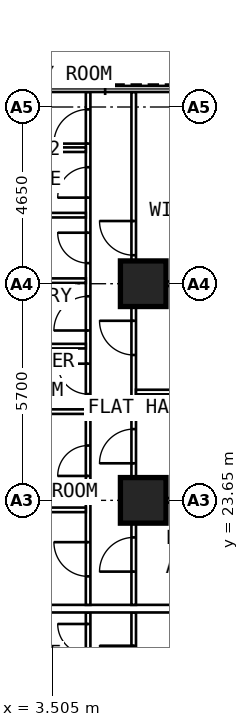
"""IFC4 building model, lengths in metres.
Left out: names, types, materials, properties, quantities, classifications, styles, units other than length and angle.
Written with IfcOpenShell. Run it as: python <this file> out.ifc"""

import sys

from ifc_helpers import new_model, si_unit, direction, frame, frame_2d, origin, origin_2d, place, context, subcontext, project, spatial, rectangle, extrude, element, fill, save


model = new_model("IFC4")
c1 = context("Model", 3, precision=1e-05, world=origin(), true_north=direction((0.0, 1.0)))
c2 = subcontext(c1, "Body", "Model", "MODEL_VIEW")
j1 = project(units=[si_unit("LENGTHUNIT", "METRE"), si_unit("PLANEANGLEUNIT", "RADIAN")], contexts=[c1])
p1 = place(None, origin())
s1 = spatial("IfcSite", under=j1, at=p1, CompositionType="ELEMENT")
p2 = place(p1, origin())
s2 = spatial("IfcBuilding", under=s1, at=p2, CompositionType="ELEMENT")
p3 = place(p2, frame((0.0, 0.0, 88.0)))
s3 = spatial("IfcBuildingStorey", under=s2, at=p3, CompositionType="ELEMENT", Elevation=88.0)
for number, where, z_axis, x_axis in (
    (1, (5.9, 23.65, 0.0), (0.0, 0.0, 1.0), (0.0, 1.0, 0.0)),
    (2, (5.9, 29.35, 0.0), (0.0, 0.0, 1.0), (0.0, 1.0, 0.0)),
):
    element("IfcColumn", number, at=place(p3, frame(where, z_axis=z_axis, x_axis=x_axis)), inside=s3, PredefinedType="COLUMN", context=c2, shape_type="SweptSolid", body=[
        extrude(rectangle(XDim=1.2, YDim=1.2, at=origin_2d()), origin(), (0.0, 0.0, 1.0), 3.6),
    ])
p4 = place(p3, frame((4.45, 10.1, 0.0), z_axis=(0.0, 0.0, 1.0), x_axis=(0.0, 1.0, 0.0)))
e3 = element("IfcWall", 3, at=p4, inside=s3, PredefinedType="PARTITIONING", context=c2, shape_type="SweptSolid", body=[
    extrude(rectangle(XDim=10.6, YDim=0.12, at=frame_2d((5.3, 0.0))), origin(), (0.0, 0.0, 1.0), 3.35),
])
p5 = place(p4, frame((1.59, 0.0, 0.0)))
e4 = element("IfcOpeningElement", 4, at=p5, cuts=e3, PredefinedType="OPENING", context=c2, shape_type="SweptSolid", body=[
    extrude(rectangle(XDim=0.8, YDim=2.1, at=frame_2d((0.4, 1.05))), frame((0.0, 0.072, 0.0), z_axis=(0.0, -1.0, 0.0), x_axis=(1.0, 0.0, 0.0)), (0.0, 0.0, 1.0), 0.144),
])
p6 = place(p4, frame((3.53, 0.0, 0.0)))
e5 = element("IfcOpeningElement", 5, at=p6, cuts=e3, PredefinedType="OPENING", context=c2, shape_type="SweptSolid", body=[
    extrude(rectangle(XDim=0.9, YDim=2.1, at=frame_2d((0.45, 1.05))), frame((0.0, 0.072, 0.0), z_axis=(0.0, -1.0, 0.0), x_axis=(1.0, 0.0, 0.0)), (0.0, 0.0, 1.0), 0.144),
])
p7 = place(p4, frame((5.884, 0.0, 0.0)))
e6 = element("IfcOpeningElement", 6, at=p7, cuts=e3, PredefinedType="OPENING", context=c2, shape_type="SweptSolid", body=[
    extrude(rectangle(XDim=0.8, YDim=2.1, at=frame_2d((0.4, 1.05))), frame((0.0, 0.072, 0.0), z_axis=(0.0, -1.0, 0.0), x_axis=(1.0, 0.0, 0.0)), (0.0, 0.0, 1.0), 0.144),
])
p8 = place(p4, frame((7.842, 0.0, 0.0)))
e7 = element("IfcOpeningElement", 7, at=p8, cuts=e3, PredefinedType="OPENING", context=c2, shape_type="SweptSolid", body=[
    extrude(rectangle(XDim=0.9, YDim=2.1, at=frame_2d((0.45, 1.05))), frame((0.0, 0.072, 0.0), z_axis=(0.0, -1.0, 0.0), x_axis=(1.0, 0.0, 0.0)), (0.0, 0.0, 1.0), 0.144),
])
p9 = place(p4, frame((9.497, 0.0, 0.0)))
e8 = element("IfcOpeningElement", 8, at=p9, cuts=e3, PredefinedType="OPENING", context=c2, shape_type="SweptSolid", body=[
    extrude(rectangle(XDim=0.8, YDim=2.1, at=frame_2d((0.4, 1.05))), frame((0.0, 0.072, 0.0), z_axis=(0.0, -1.0, 0.0), x_axis=(1.0, 0.0, 0.0)), (0.0, 0.0, 1.0), 0.144),
])
p10 = place(p3, frame((5.65, 9.6, 0.0), z_axis=(0.0, 0.0, 1.0), x_axis=(0.0, 1.0, 0.0)))
e9 = element("IfcWall", 9, at=p10, inside=s3, PredefinedType="PARTITIONING", context=c2, shape_type="SweptSolid", body=[
    extrude(rectangle(XDim=11.1, YDim=0.12, at=frame_2d((5.55, 0.0))), origin(), (0.0, 0.0, 1.0), 3.35),
])
p11 = place(p10, frame((1.0, 0.0, 0.0)))
e10 = element("IfcOpeningElement", 10, at=p11, cuts=e9, PredefinedType="OPENING", context=c2, shape_type="SweptSolid", body=[
    extrude(rectangle(XDim=0.9, YDim=2.1, at=frame_2d((0.45, 1.05))), frame((0.0, 0.072, 0.0), z_axis=(0.0, -1.0, 0.0), x_axis=(1.0, 0.0, 0.0)), (0.0, 0.0, 1.0), 0.144),
])
p12 = place(p10, frame((3.625, 0.0, 0.0)))
e11 = element("IfcOpeningElement", 11, at=p12, cuts=e9, PredefinedType="OPENING", context=c2, shape_type="SweptSolid", body=[
    extrude(rectangle(XDim=0.9, YDim=2.1, at=frame_2d((0.45, 1.05))), frame((0.0, 0.072, 0.0), z_axis=(0.0, -1.0, 0.0), x_axis=(1.0, 0.0, 0.0)), (0.0, 0.0, 1.0), 0.144),
])
p13 = place(p10, frame((6.475, 0.0, 0.0)))
e12 = element("IfcOpeningElement", 12, at=p13, cuts=e9, PredefinedType="OPENING", context=c2, shape_type="SweptSolid", body=[
    extrude(rectangle(XDim=0.9, YDim=2.1, at=frame_2d((0.45, 1.05))), frame((0.0, 0.072, 0.0), z_axis=(0.0, -1.0, 0.0), x_axis=(1.0, 0.0, 0.0)), (0.0, 0.0, 1.0), 0.144),
])
p14 = place(p10, frame((9.325, 0.0, 0.0)))
e13 = element("IfcOpeningElement", 13, at=p14, cuts=e9, PredefinedType="OPENING", context=c2, shape_type="SweptSolid", body=[
    extrude(rectangle(XDim=0.9, YDim=2.1, at=frame_2d((0.45, 1.05))), frame((0.0, 0.072, 0.0), z_axis=(0.0, -1.0, 0.0), x_axis=(1.0, 0.0, 0.0)), (0.0, 0.0, 1.0), 0.144),
])
p15 = place(p3, frame((4.45, 20.9, 0.0), z_axis=(0.0, 0.0, 1.0), x_axis=(0.0, 1.0, 0.0)))
e14 = element("IfcWall", 14, at=p15, inside=s3, PredefinedType="PARTITIONING", context=c2, shape_type="SweptSolid", body=[
    extrude(rectangle(XDim=13.495, YDim=0.12, at=frame_2d((6.748, 0.0))), origin(), (0.0, 0.0, 1.0), 3.35),
])
p16 = place(p15, frame((0.75, 0.0, 0.0)))
e15 = element("IfcOpeningElement", 15, at=p16, cuts=e14, PredefinedType="OPENING", context=c2, shape_type="SweptSolid", body=[
    extrude(rectangle(XDim=0.9, YDim=2.1, at=frame_2d((0.45, 1.05))), frame((0.0, 0.072, 0.0), z_axis=(0.0, -1.0, 0.0), x_axis=(1.0, 0.0, 0.0)), (0.0, 0.0, 1.0), 0.144),
])
p17 = place(p15, frame((3.392, 0.0, 0.0)))
e16 = element("IfcOpeningElement", 16, at=p17, cuts=e14, PredefinedType="OPENING", context=c2, shape_type="SweptSolid", body=[
    extrude(rectangle(XDim=0.8, YDim=2.1, at=frame_2d((0.4, 1.05))), frame((0.0, 0.072, 0.0), z_axis=(0.0, -1.0, 0.0), x_axis=(1.0, 0.0, 0.0)), (0.0, 0.0, 1.0), 0.144),
])
p18 = place(p15, frame((5.546, 0.0, 0.0)))
e17 = element("IfcOpeningElement", 17, at=p18, cuts=e14, PredefinedType="OPENING", context=c2, shape_type="SweptSolid", body=[
    extrude(rectangle(XDim=0.8, YDim=2.1, at=frame_2d((0.4, 1.05))), frame((0.0, 0.072, 0.0), z_axis=(0.0, -1.0, 0.0), x_axis=(1.0, 0.0, 0.0)), (0.0, 0.0, 1.0), 0.144),
])
p19 = place(p15, frame((7.219, 0.0, 0.0)))
e18 = element("IfcOpeningElement", 18, at=p19, cuts=e14, PredefinedType="OPENING", context=c2, shape_type="SweptSolid", body=[
    extrude(rectangle(XDim=0.9, YDim=2.1, at=frame_2d((0.45, 1.05))), frame((0.0, 0.072, 0.0), z_axis=(0.0, -1.0, 0.0), x_axis=(1.0, 0.0, 0.0)), (0.0, 0.0, 1.0), 0.144),
])
p20 = place(p15, frame((8.992, 0.0, 0.0)))
e19 = element("IfcOpeningElement", 19, at=p20, cuts=e14, PredefinedType="OPENING", context=c2, shape_type="SweptSolid", body=[
    extrude(rectangle(XDim=0.8, YDim=2.1, at=frame_2d((0.4, 1.05))), frame((0.0, 0.072, 0.0), z_axis=(0.0, -1.0, 0.0), x_axis=(1.0, 0.0, 0.0)), (0.0, 0.0, 1.0), 0.144),
])
p21 = place(p15, frame((10.715, 0.0, 0.0)))
e20 = element("IfcOpeningElement", 20, at=p21, cuts=e14, PredefinedType="OPENING", context=c2, shape_type="SweptSolid", body=[
    extrude(rectangle(XDim=0.8, YDim=2.1, at=frame_2d((0.4, 1.05))), frame((0.0, 0.072, 0.0), z_axis=(0.0, -1.0, 0.0), x_axis=(1.0, 0.0, 0.0)), (0.0, 0.0, 1.0), 0.144),
])
p22 = place(p15, frame((12.137, 0.0, 0.0)))
e21 = element("IfcOpeningElement", 21, at=p22, cuts=e14, PredefinedType="OPENING", context=c2, shape_type="SweptSolid", body=[
    extrude(rectangle(XDim=0.9, YDim=2.1, at=frame_2d((0.45, 1.05))), frame((0.0, 0.072, 0.0), z_axis=(0.0, -1.0, 0.0), x_axis=(1.0, 0.0, 0.0)), (0.0, 0.0, 1.0), 0.144),
])
p23 = place(p3, frame((5.65, 20.9, 0.0), z_axis=(0.0, 0.0, 1.0), x_axis=(0.0, 1.0, 0.0)))
e22 = element("IfcWall", 22, at=p23, inside=s3, PredefinedType="PARTITIONING", context=c2, shape_type="SweptSolid", body=[
    extrude(rectangle(XDim=13.495, YDim=0.12, at=frame_2d((6.748, 0.0))), origin(), (0.0, 0.0, 1.0), 3.35),
])
p24 = place(p23, frame((0.875, 0.0, 0.0)))
e23 = element("IfcOpeningElement", 23, at=p24, cuts=e22, PredefinedType="OPENING", context=c2, shape_type="SweptSolid", body=[
    extrude(rectangle(XDim=0.9, YDim=2.1, at=frame_2d((0.45, 1.05))), frame((0.0, 0.072, 0.0), z_axis=(0.0, -1.0, 0.0), x_axis=(1.0, 0.0, 0.0)), (0.0, 0.0, 1.0), 0.144),
])
p25 = place(p23, frame((3.725, 0.0, 0.0)))
e24 = element("IfcOpeningElement", 24, at=p25, cuts=e22, PredefinedType="OPENING", context=c2, shape_type="SweptSolid", body=[
    extrude(rectangle(XDim=0.9, YDim=2.1, at=frame_2d((0.45, 1.05))), frame((0.0, 0.072, 0.0), z_axis=(0.0, -1.0, 0.0), x_axis=(1.0, 0.0, 0.0)), (0.0, 0.0, 1.0), 0.144),
])
p26 = place(p23, frame((6.575, 0.0, 0.0)))
e25 = element("IfcOpeningElement", 25, at=p26, cuts=e22, PredefinedType="OPENING", context=c2, shape_type="SweptSolid", body=[
    extrude(rectangle(XDim=0.9, YDim=2.1, at=frame_2d((0.45, 1.05))), frame((0.0, 0.072, 0.0), z_axis=(0.0, -1.0, 0.0), x_axis=(1.0, 0.0, 0.0)), (0.0, 0.0, 1.0), 0.144),
])
p27 = place(p23, frame((9.2, 0.0, 0.0)))
e26 = element("IfcOpeningElement", 26, at=p27, cuts=e22, PredefinedType="OPENING", context=c2, shape_type="SweptSolid", body=[
    extrude(rectangle(XDim=0.9, YDim=2.1, at=frame_2d((0.45, 1.05))), frame((0.0, 0.072, 0.0), z_axis=(0.0, -1.0, 0.0), x_axis=(1.0, 0.0, 0.0)), (0.0, 0.0, 1.0), 0.144),
])
p28 = place(p3, frame((5.71, 23.65, 0.0), z_axis=(0.0, 0.0, 1.0), x_axis=(1.0, 0.0, 0.0)))
e27 = element("IfcWall", 27, at=p28, inside=s3, PredefinedType="PARTITIONING", context=c2, shape_type="SweptSolid", body=[
    extrude(rectangle(XDim=4.99, YDim=0.12, at=frame_2d((2.495, 0.0))), origin(), (0.0, 0.0, 1.0), 2.45),
])
p29 = place(p3, frame((5.71, 26.5, 0.0), z_axis=(0.0, 0.0, 1.0), x_axis=(1.0, 0.0, 0.0)))
e28 = element("IfcWall", 28, at=p29, inside=s3, PredefinedType="PARTITIONING", context=c2, shape_type="SweptSolid", body=[
    extrude(rectangle(XDim=4.99, YDim=0.12, at=frame_2d((2.495, 0.0))), origin(), (0.0, 0.0, 1.0), 3.35),
])
p30 = place(p3, frame((5.71, 29.35, 0.0), z_axis=(0.0, 0.0, 1.0), x_axis=(1.0, 0.0, 0.0)))
e29 = element("IfcWall", 29, at=p30, inside=s3, PredefinedType="PARTITIONING", context=c2, shape_type="SweptSolid", body=[
    extrude(rectangle(XDim=4.99, YDim=0.12, at=frame_2d((2.495, 0.0))), origin(), (0.0, 0.0, 1.0), 2.45),
])
p31 = place(p3, frame((2.1, 23.4, 0.0), z_axis=(0.0, 0.0, 1.0), x_axis=(1.0, 0.0, 0.0)))
e30 = element("IfcWall", 30, at=p31, inside=s3, PredefinedType="PARTITIONING", context=c2, shape_type="SweptSolid", body=[
    extrude(rectangle(XDim=2.29, YDim=0.12, at=frame_2d((1.145, 0.0))), origin(), (0.0, 0.0, 1.0), 2.45),
])
for number, where, z_axis, x_axis in (
    (31, (2.1, 25.985, 0.0), (0.0, 0.0, 1.0), (1.0, 0.0, 0.0)),
    (32, (2.1, 27.708, 0.0), (0.0, 0.0, 1.0), (1.0, 0.0, 0.0)),
):
    element("IfcWall", number, at=place(p3, frame(where, z_axis=z_axis, x_axis=x_axis)), inside=s3, PredefinedType="PARTITIONING", context=c2, shape_type="SweptSolid", body=[
        extrude(rectangle(XDim=2.29, YDim=0.12, at=frame_2d((1.145, 0.0))), origin(), (0.0, 0.0, 1.0), 3.35),
    ])
p32 = place(p3, frame((2.1, 29.431, 0.0), z_axis=(0.0, 0.0, 1.0), x_axis=(1.0, 0.0, 0.0)))
e33 = element("IfcWall", 33, at=p32, inside=s3, PredefinedType="PARTITIONING", context=c2, shape_type="SweptSolid", body=[
    extrude(rectangle(XDim=2.29, YDim=0.12, at=frame_2d((1.145, 0.0))), origin(), (0.0, 0.0, 1.0), 2.45),
])
for number, where, z_axis, x_axis in (
    (34, (2.1, 31.154, 0.0), (0.0, 0.0, 1.0), (1.0, 0.0, 0.0)),
    (35, (2.1, 32.877, 0.0), (0.0, 0.0, 1.0), (1.0, 0.0, 0.0)),
):
    element("IfcWall", number, at=place(p3, frame(where, z_axis=z_axis, x_axis=x_axis)), inside=s3, PredefinedType="PARTITIONING", context=c2, shape_type="SweptSolid", body=[
        extrude(rectangle(XDim=2.29, YDim=0.12, at=frame_2d((1.145, 0.0))), origin(), (0.0, 0.0, 1.0), 3.35),
    ])
p33 = place(p3, frame((2.1, 20.8, 0.0), z_axis=(0.0, 0.0, 1.0), x_axis=(1.0, 0.0, 0.0)))
e36 = element("IfcWall", 36, at=p33, inside=s3, PredefinedType="PARTITIONING", context=c2, shape_type="SweptSolid", body=[
    extrude(rectangle(XDim=8.6, YDim=0.2, at=frame_2d((4.3, 0.0))), origin(), (0.0, 0.0, 1.0), 3.35),
])
p34 = place(p14, origin())
e37 = element("IfcDoor", 37, at=p34, inside=s3, OperationType="SINGLE_SWING_RIGHT", PredefinedType="DOOR", context=c2, shape_type="SweptSolid", body=[
    extrude(rectangle(XDim=0.9, YDim=2.1, at=frame_2d((0.45, 1.05))), frame((0.0, 0.025, 0.0), z_axis=(0.0, -1.0, 0.0), x_axis=(1.0, 0.0, 0.0)), (0.0, 0.0, 1.0), 0.05),
])
fill(e13, e37)
p35 = place(p9, origin())
e38 = element("IfcDoor", 38, at=p35, inside=s3, OperationType="SINGLE_SWING_RIGHT", PredefinedType="DOOR", context=c2, shape_type="SweptSolid", body=[
    extrude(rectangle(XDim=0.8, YDim=2.1, at=frame_2d((0.4, 1.05))), frame((0.0, 0.025, 0.0), z_axis=(0.0, -1.0, 0.0), x_axis=(1.0, 0.0, 0.0)), (0.0, 0.0, 1.0), 0.05),
])
fill(e8, e38)
p36 = place(p24, origin())
e39 = element("IfcDoor", 39, at=p36, inside=s3, OperationType="SINGLE_SWING_LEFT", PredefinedType="DOOR", context=c2, shape_type="SweptSolid", body=[
    extrude(rectangle(XDim=0.9, YDim=2.1, at=frame_2d((0.45, 1.05))), frame((0.0, 0.025, 0.0), z_axis=(0.0, -1.0, 0.0), x_axis=(1.0, 0.0, 0.0)), (0.0, 0.0, 1.0), 0.05),
])
fill(e23, e39)
p37 = place(p25, origin())
e40 = element("IfcDoor", 40, at=p37, inside=s3, OperationType="SINGLE_SWING_LEFT", PredefinedType="DOOR", context=c2, shape_type="SweptSolid", body=[
    extrude(rectangle(XDim=0.9, YDim=2.1, at=frame_2d((0.45, 1.05))), frame((0.0, 0.025, 0.0), z_axis=(0.0, -1.0, 0.0), x_axis=(1.0, 0.0, 0.0)), (0.0, 0.0, 1.0), 0.05),
])
fill(e24, e40)
p38 = place(p26, origin())
e41 = element("IfcDoor", 41, at=p38, inside=s3, OperationType="SINGLE_SWING_RIGHT", PredefinedType="DOOR", context=c2, shape_type="SweptSolid", body=[
    extrude(rectangle(XDim=0.9, YDim=2.1, at=frame_2d((0.45, 1.05))), frame((0.0, 0.025, 0.0), z_axis=(0.0, -1.0, 0.0), x_axis=(1.0, 0.0, 0.0)), (0.0, 0.0, 1.0), 0.05),
])
fill(e25, e41)
p39 = place(p27, origin())
e42 = element("IfcDoor", 42, at=p39, inside=s3, OperationType="SINGLE_SWING_RIGHT", PredefinedType="DOOR", context=c2, shape_type="SweptSolid", body=[
    extrude(rectangle(XDim=0.9, YDim=2.1, at=frame_2d((0.45, 1.05))), frame((0.0, 0.025, 0.0), z_axis=(0.0, -1.0, 0.0), x_axis=(1.0, 0.0, 0.0)), (0.0, 0.0, 1.0), 0.05),
])
fill(e26, e42)
p40 = place(p16, origin())
e43 = element("IfcDoor", 43, at=p40, inside=s3, OperationType="SINGLE_SWING_RIGHT", PredefinedType="DOOR", context=c2, shape_type="SweptSolid", body=[
    extrude(rectangle(XDim=0.9, YDim=2.1, at=frame_2d((0.45, 1.05))), frame((0.0, 0.025, 0.0), z_axis=(0.0, -1.0, 0.0), x_axis=(1.0, 0.0, 0.0)), (0.0, 0.0, 1.0), 0.05),
])
fill(e15, e43)
p41 = place(p17, origin())
e44 = element("IfcDoor", 44, at=p41, inside=s3, OperationType="SINGLE_SWING_LEFT", PredefinedType="DOOR", context=c2, shape_type="SweptSolid", body=[
    extrude(rectangle(XDim=0.8, YDim=2.1, at=frame_2d((0.4, 1.05))), frame((0.0, 0.025, 0.0), z_axis=(0.0, -1.0, 0.0), x_axis=(1.0, 0.0, 0.0)), (0.0, 0.0, 1.0), 0.05),
])
fill(e16, e44)
p42 = place(p18, origin())
e45 = element("IfcDoor", 45, at=p42, inside=s3, OperationType="SINGLE_SWING_RIGHT", PredefinedType="DOOR", context=c2, shape_type="SweptSolid", body=[
    extrude(rectangle(XDim=0.8, YDim=2.1, at=frame_2d((0.4, 1.05))), frame((0.0, 0.025, 0.0), z_axis=(0.0, -1.0, 0.0), x_axis=(1.0, 0.0, 0.0)), (0.0, 0.0, 1.0), 0.05),
])
fill(e17, e45)
p43 = place(p19, origin())
e46 = element("IfcDoor", 46, at=p43, inside=s3, OperationType="SINGLE_SWING_LEFT", PredefinedType="DOOR", context=c2, shape_type="SweptSolid", body=[
    extrude(rectangle(XDim=0.9, YDim=2.1, at=frame_2d((0.45, 1.05))), frame((0.0, 0.025, 0.0), z_axis=(0.0, -1.0, 0.0), x_axis=(1.0, 0.0, 0.0)), (0.0, 0.0, 1.0), 0.05),
])
fill(e18, e46)
p44 = place(p20, origin())
e47 = element("IfcDoor", 47, at=p44, inside=s3, OperationType="SINGLE_SWING_RIGHT", PredefinedType="DOOR", context=c2, shape_type="SweptSolid", body=[
    extrude(rectangle(XDim=0.8, YDim=2.1, at=frame_2d((0.4, 1.05))), frame((0.0, 0.025, 0.0), z_axis=(0.0, -1.0, 0.0), x_axis=(1.0, 0.0, 0.0)), (0.0, 0.0, 1.0), 0.05),
])
fill(e19, e47)
p45 = place(p21, origin())
e48 = element("IfcDoor", 48, at=p45, inside=s3, OperationType="SINGLE_SWING_LEFT", PredefinedType="DOOR", context=c2, shape_type="SweptSolid", body=[
    extrude(rectangle(XDim=0.8, YDim=2.1, at=frame_2d((0.4, 1.05))), frame((0.0, 0.025, 0.0), z_axis=(0.0, -1.0, 0.0), x_axis=(1.0, 0.0, 0.0)), (0.0, 0.0, 1.0), 0.05),
])
fill(e20, e48)
p46 = place(p22, origin())
e49 = element("IfcDoor", 49, at=p46, inside=s3, OperationType="SINGLE_SWING_LEFT", PredefinedType="DOOR", context=c2, shape_type="SweptSolid", body=[
    extrude(rectangle(XDim=0.9, YDim=2.1, at=frame_2d((0.45, 1.05))), frame((0.0, 0.025, 0.0), z_axis=(0.0, -1.0, 0.0), x_axis=(1.0, 0.0, 0.0)), (0.0, 0.0, 1.0), 0.05),
])
fill(e21, e49)
save(model, sys.argv[1])
